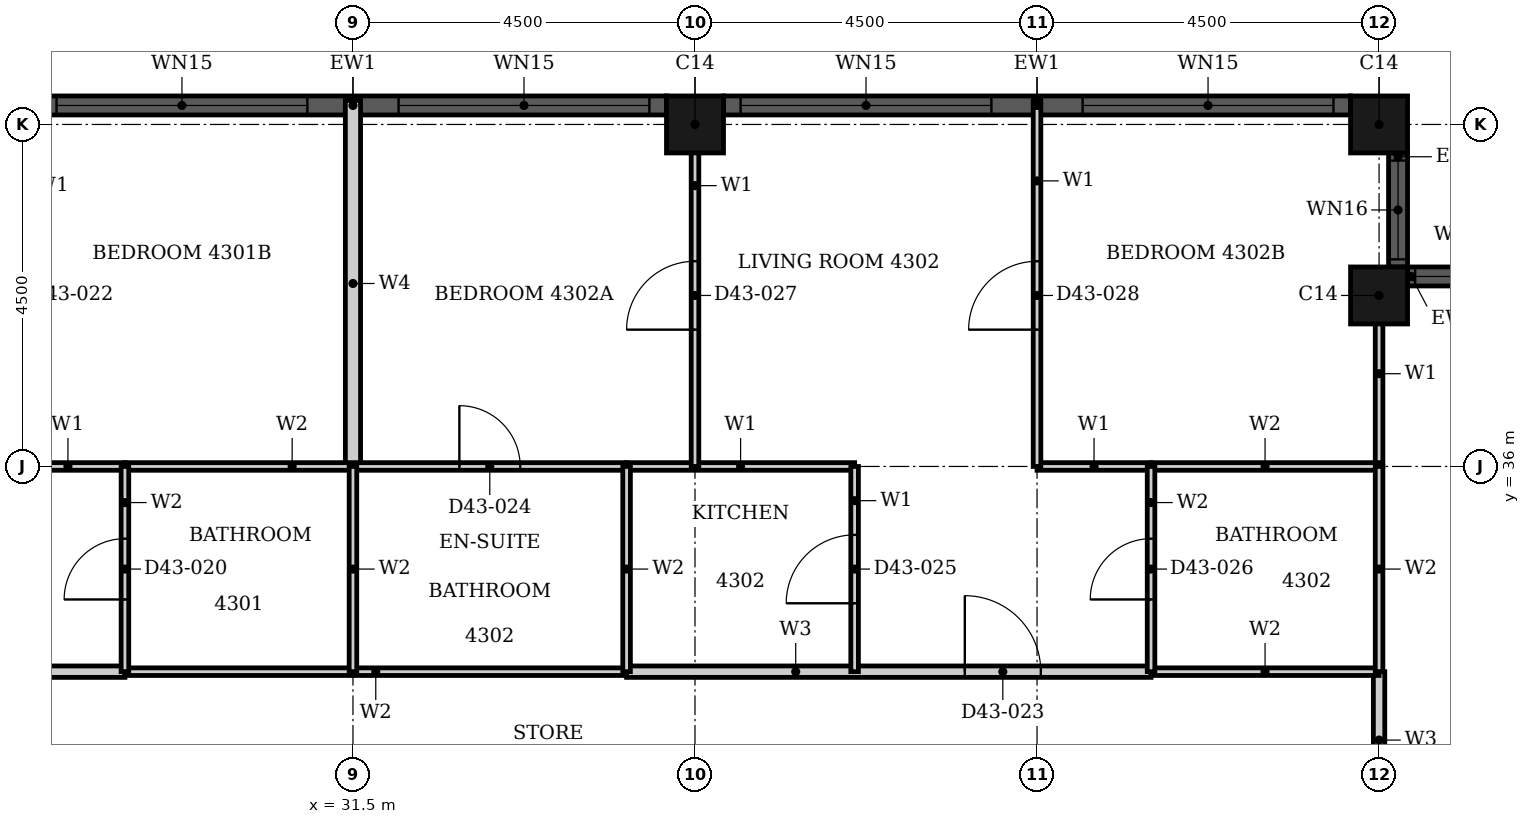
"""IFC4 building model, lengths in metres.
Left out: names, types, materials, properties, quantities, classifications, styles, units other than length and angle.
Written with IfcOpenShell. Run it as: python <this file> out.ifc"""

import sys

from ifc_helpers import new_model, si_unit, direction, frame, frame_2d, origin, origin_2d, place, context, subcontext, project, spatial, rectangle, hollow_rectangle, extrude, element, fill, save


model = new_model("IFC4")
c1 = context("Model", 3, precision=1e-05, world=origin(), true_north=direction((0.0, 1.0)))
c2 = subcontext(c1, "Body", "Model", "MODEL_VIEW")
j1 = project(units=[si_unit("LENGTHUNIT", "METRE"), si_unit("PLANEANGLEUNIT", "RADIAN")], contexts=[c1])
p1 = place(None, origin())
s1 = spatial("IfcSite", under=j1, at=p1, CompositionType="ELEMENT")
p2 = place(p1, origin())
s2 = spatial("IfcBuilding", under=s1, at=p2, CompositionType="ELEMENT")
p3 = place(p2, frame((0.0, 0.0, 172.8)))
s3 = spatial("IfcBuildingStorey", under=s2, at=p3, CompositionType="ELEMENT", Elevation=172.8)
for number, where, z_axis, x_axis in (
    (1, (45.0, 38.25, 0.0), (0.0, 0.0, 1.0), (1.0, 0.0, 0.0)),
    (2, (45.0, 40.5, 0.0), (0.0, 0.0, 1.0), (1.0, 0.0, 0.0)),
    (3, (36.0, 40.5, 0.0), (0.0, 0.0, 1.0), (1.0, 0.0, 0.0)),
):
    element("IfcColumn", number, at=place(p3, frame(where, z_axis=z_axis, x_axis=x_axis)), inside=s3, PredefinedType="COLUMN", context=c2, shape_type="SweptSolid", body=[
        extrude(hollow_rectangle(XDim=0.75, YDim=0.75, WallThickness=0.024, at=origin_2d()), origin(), (0.0, 0.0, 1.0), 3.7),
    ])
p4 = place(p3, frame((46.875, 38.5, 0.0), z_axis=(0.0, 0.0, 1.0), x_axis=(-1.0, 0.0, 0.0)))
e4 = element("IfcWall", 4, at=p4, inside=s3, PredefinedType="SOLIDWALL", context=c2, shape_type="SweptSolid", body=[
    extrude(rectangle(XDim=1.5, YDim=0.25, at=frame_2d((0.75, 0.0))), origin(), (0.0, 0.0, 1.0), 3.7),
])
p5 = place(p4, frame((0.1, 0.0, 0.9)))
e5 = element("IfcOpeningElement", 5, at=p5, cuts=e4, PredefinedType="OPENING", context=c2, shape_type="SweptSolid", body=[
    extrude(rectangle(XDim=1.3, YDim=1.85, at=frame_2d((0.65, 0.925))), frame((0.0, 0.135, 0.0), z_axis=(0.0, -1.0, 0.0), x_axis=(1.0, 0.0, 0.0)), (0.0, 0.0, 1.0), 0.27),
])
p6 = place(p3, frame((45.25, 38.625, 0.0), z_axis=(0.0, 0.0, 1.0), x_axis=(0.0, 1.0, 0.0)))
e6 = element("IfcWall", 6, at=p6, inside=s3, PredefinedType="SOLIDWALL", context=c2, shape_type="SweptSolid", body=[
    extrude(rectangle(XDim=1.5, YDim=0.25, at=frame_2d((0.75, 0.0))), origin(), (0.0, 0.0, 1.0), 3.7),
])
p7 = place(p6, frame((0.1, 0.0, 0.9)))
e7 = element("IfcOpeningElement", 7, at=p7, cuts=e6, PredefinedType="OPENING", context=c2, shape_type="SweptSolid", body=[
    extrude(rectangle(XDim=1.3, YDim=1.85, at=frame_2d((0.65, 0.925))), frame((0.0, 0.135, 0.0), z_axis=(0.0, -1.0, 0.0), x_axis=(1.0, 0.0, 0.0)), (0.0, 0.0, 1.0), 0.27),
])
p8 = place(p3, frame((44.625, 40.75, 0.0), z_axis=(0.0, 0.0, 1.0), x_axis=(-1.0, 0.0, 0.0)))
e8 = element("IfcWall", 8, at=p8, inside=s3, PredefinedType="SOLIDWALL", context=c2, shape_type="SweptSolid", body=[
    extrude(rectangle(XDim=8.25, YDim=0.25, at=frame_2d((4.125, 0.0))), origin(), (0.0, 0.0, 1.0), 3.7),
])
p9 = place(p8, frame((0.225, 0.0, 0.45)))
e9 = element("IfcOpeningElement", 9, at=p9, cuts=e8, PredefinedType="OPENING", context=c2, shape_type="SweptSolid", body=[
    extrude(rectangle(XDim=3.3, YDim=2.3, at=frame_2d((1.65, 1.15))), frame((0.0, 0.135, 0.0), z_axis=(0.0, -1.0, 0.0), x_axis=(1.0, 0.0, 0.0)), (0.0, 0.0, 1.0), 0.27),
])
p10 = place(p8, frame((4.725, 0.0, 0.45)))
e10 = element("IfcOpeningElement", 10, at=p10, cuts=e8, PredefinedType="OPENING", context=c2, shape_type="SweptSolid", body=[
    extrude(rectangle(XDim=3.3, YDim=2.3, at=frame_2d((1.65, 1.15))), frame((0.0, 0.135, 0.0), z_axis=(0.0, -1.0, 0.0), x_axis=(1.0, 0.0, 0.0)), (0.0, 0.0, 1.0), 0.27),
])
p11 = place(p3, frame((35.625, 40.75, 0.0), z_axis=(0.0, 0.0, 1.0), x_axis=(-1.0, 0.0, 0.0)))
e11 = element("IfcWall", 11, at=p11, inside=s3, PredefinedType="SOLIDWALL", context=c2, shape_type="SweptSolid", body=[
    extrude(rectangle(XDim=8.25, YDim=0.25, at=frame_2d((4.125, 0.0))), origin(), (0.0, 0.0, 1.0), 3.7),
])
p12 = place(p11, frame((0.225, 0.0, 0.45)))
e12 = element("IfcOpeningElement", 12, at=p12, cuts=e11, PredefinedType="OPENING", context=c2, shape_type="SweptSolid", body=[
    extrude(rectangle(XDim=3.3, YDim=2.3, at=frame_2d((1.65, 1.15))), frame((0.0, 0.135, 0.0), z_axis=(0.0, -1.0, 0.0), x_axis=(1.0, 0.0, 0.0)), (0.0, 0.0, 1.0), 0.27),
])
p13 = place(p11, frame((4.725, 0.0, 0.45)))
e13 = element("IfcOpeningElement", 13, at=p13, cuts=e11, PredefinedType="OPENING", context=c2, shape_type="SweptSolid", body=[
    extrude(rectangle(XDim=3.3, YDim=2.3, at=frame_2d((1.65, 1.15))), frame((0.0, 0.135, 0.0), z_axis=(0.0, -1.0, 0.0), x_axis=(1.0, 0.0, 0.0)), (0.0, 0.0, 1.0), 0.27),
])
p14 = place(p3, frame((21.6, 33.3, 0.0), z_axis=(0.0, 0.0, 1.0), x_axis=(1.0, 0.0, 0.0)))
e14 = element("IfcWall", 14, at=p14, inside=s3, PredefinedType="PARTITIONING", context=c2, shape_type="SweptSolid", body=[
    extrude(rectangle(XDim=6.9, YDim=0.15, at=frame_2d((3.45, 0.0))), origin(), (0.0, 0.0, 1.0), 3.4),
])
p15 = place(p14, frame((4.45, 0.0, 0.0)))
e15 = element("IfcOpeningElement", 15, at=p15, cuts=e14, PredefinedType="OPENING", context=c2, shape_type="SweptSolid", body=[
    extrude(rectangle(XDim=1.0, YDim=2.2, at=frame_2d((0.5, 1.1))), frame((0.0, 0.085, 0.0), z_axis=(0.0, -1.0, 0.0), x_axis=(1.0, 0.0, 0.0)), (0.0, 0.0, 1.0), 0.17),
])
p16 = place(p3, frame((35.1, 33.3, 0.0), z_axis=(0.0, 0.0, 1.0), x_axis=(1.0, 0.0, 0.0)))
e16 = element("IfcWall", 16, at=p16, inside=s3, PredefinedType="PARTITIONING", context=c2, shape_type="SweptSolid", body=[
    extrude(rectangle(XDim=6.9, YDim=0.15, at=frame_2d((3.45, 0.0))), origin(), (0.0, 0.0, 1.0), 3.4),
])
p17 = place(p16, frame((4.45, 0.0, 0.0)))
e17 = element("IfcOpeningElement", 17, at=p17, cuts=e16, PredefinedType="OPENING", context=c2, shape_type="SweptSolid", body=[
    extrude(rectangle(XDim=1.0, YDim=2.2, at=frame_2d((0.5, 1.1))), frame((0.0, 0.085, 0.0), z_axis=(0.0, -1.0, 0.0), x_axis=(1.0, 0.0, 0.0)), (0.0, 0.0, 1.0), 0.17),
])
p18 = place(p3, frame((45.0, 31.5, 0.0), z_axis=(0.0, 0.0, 1.0), x_axis=(0.0, 1.0, 0.0)))
e18 = element("IfcWall", 18, at=p18, inside=s3, PredefinedType="PARTITIONING", context=c2, shape_type="SweptSolid", body=[
    extrude(rectangle(XDim=1.8, YDim=0.15, at=frame_2d((0.9, 0.0))), origin(), (0.0, 0.0, 1.0), 3.4),
])
for number, where, z_axis, x_axis in (
    (19, (27.0, 36.0, 0.0), (0.0, 0.0, 1.0), (1.0, 0.0, 0.0)),
    (20, (40.5, 36.0, 0.0), (0.0, 0.0, 1.0), (1.0, 0.0, 0.0)),
):
    element("IfcWall", number, at=place(p3, frame(where, z_axis=z_axis, x_axis=x_axis)), inside=s3, PredefinedType="PARTITIONING", context=c2, shape_type="SweptSolid", body=[
        extrude(rectangle(XDim=1.5, YDim=0.1, at=frame_2d((0.75, 0.0))), origin(), (0.0, 0.0, 1.0), 3.4),
    ])
p19 = place(p3, frame((35.1, 36.0, 0.0), z_axis=(0.0, 0.0, 1.0), x_axis=(1.0, 0.0, 0.0)))
e21 = element("IfcWall", 21, at=p19, inside=s3, PredefinedType="PARTITIONING", context=c2, shape_type="SweptSolid", body=[
    extrude(rectangle(XDim=3.0, YDim=0.1, at=frame_2d((1.5, 0.0))), origin(), (0.0, 0.0, 1.0), 3.4),
])
p20 = place(p3, frame((36.0, 36.0, 0.0), z_axis=(0.0, 0.0, 1.0), x_axis=(0.0, 1.0, 0.0)))
e22 = element("IfcWall", 22, at=p20, inside=s3, PredefinedType="PARTITIONING", context=c2, shape_type="SweptSolid", body=[
    extrude(rectangle(XDim=4.69, YDim=0.1, at=frame_2d((2.345, 0.0))), origin(), (0.0, 0.0, 1.0), 3.4),
])
p21 = place(p20, frame((1.8, 0.0, 0.0)))
e23 = element("IfcOpeningElement", 23, at=p21, cuts=e22, PredefinedType="OPENING", context=c2, shape_type="SweptSolid", body=[
    extrude(rectangle(XDim=0.9, YDim=2.1, at=frame_2d((0.45, 1.05))), frame((0.0, 0.06, 0.0), z_axis=(0.0, -1.0, 0.0), x_axis=(1.0, 0.0, 0.0)), (0.0, 0.0, 1.0), 0.12),
])
p22 = place(p3, frame((38.1, 33.3, 0.0), z_axis=(0.0, 0.0, 1.0), x_axis=(0.0, 1.0, 0.0)))
e24 = element("IfcWall", 24, at=p22, inside=s3, PredefinedType="PARTITIONING", context=c2, shape_type="SweptSolid", body=[
    extrude(rectangle(XDim=2.7, YDim=0.1, at=frame_2d((1.35, 0.0))), origin(), (0.0, 0.0, 1.0), 3.4),
])
p23 = place(p22, frame((0.9, 0.0, 0.0)))
e25 = element("IfcOpeningElement", 25, at=p23, cuts=e24, PredefinedType="OPENING", context=c2, shape_type="SweptSolid", body=[
    extrude(rectangle(XDim=0.9, YDim=2.1, at=frame_2d((0.45, 1.05))), frame((0.0, 0.06, 0.0), z_axis=(0.0, -1.0, 0.0), x_axis=(1.0, 0.0, 0.0)), (0.0, 0.0, 1.0), 0.12),
])
p24 = place(p3, frame((40.5, 36.0, 0.0), z_axis=(0.0, 0.0, 1.0), x_axis=(0.0, 1.0, 0.0)))
e26 = element("IfcWall", 26, at=p24, inside=s3, PredefinedType="PARTITIONING", context=c2, shape_type="SweptSolid", body=[
    extrude(rectangle(XDim=4.815, YDim=0.1, at=frame_2d((2.407, 0.0))), origin(), (0.0, 0.0, 1.0), 3.4),
])
p25 = place(p24, frame((1.8, 0.0, 0.0)))
e27 = element("IfcOpeningElement", 27, at=p25, cuts=e26, PredefinedType="OPENING", context=c2, shape_type="SweptSolid", body=[
    extrude(rectangle(XDim=0.9, YDim=2.1, at=frame_2d((0.45, 1.05))), frame((0.0, 0.06, 0.0), z_axis=(0.0, -1.0, 0.0), x_axis=(1.0, 0.0, 0.0)), (0.0, 0.0, 1.0), 0.12),
])
p26 = place(p3, frame((45.0, 36.001, 0.0), z_axis=(0.0, 0.0, 1.0), x_axis=(0.0, 1.0, 0.0)))
e28 = element("IfcWall", 28, at=p26, inside=s3, PredefinedType="PARTITIONING", context=c2, shape_type="SweptSolid", body=[
    extrude(rectangle(XDim=2.439, YDim=0.1, at=frame_2d((1.219, 0.0))), origin(), (0.0, 0.0, 1.0), 3.4),
])
p27 = place(p3, frame((31.5, 36.0, 0.0), z_axis=(0.0, 0.0, 1.0), x_axis=(0.0, 1.0, 0.0)))
e29 = element("IfcWall", 29, at=p27, inside=s3, PredefinedType="PARTITIONING", context=c2, shape_type="SweptSolid", body=[
    extrude(rectangle(XDim=4.815, YDim=0.2, at=frame_2d((2.407, 0.0))), origin(), (0.0, 0.0, 1.0), 3.4),
])
p28 = place(p3, frame((28.5, 33.3, 0.0), z_axis=(0.0, 0.0, 1.0), x_axis=(1.0, 0.0, 0.0)))
e30 = element("IfcWall", 30, at=p28, inside=s3, PredefinedType="PARTITIONING", context=c2, shape_type="SweptSolid", body=[
    extrude(rectangle(XDim=6.6, YDim=0.1, at=frame_2d((3.3, 0.0))), origin(), (0.0, 0.0, 1.0), 3.4),
])
p29 = place(p3, frame((42.0, 33.3, 0.0), z_axis=(0.0, 0.0, 1.0), x_axis=(1.0, 0.0, 0.0)))
e31 = element("IfcWall", 31, at=p29, inside=s3, PredefinedType="PARTITIONING", context=c2, shape_type="SweptSolid", body=[
    extrude(rectangle(XDim=3.0, YDim=0.1, at=frame_2d((1.5, 0.0))), origin(), (0.0, 0.0, 1.0), 3.4),
])
p30 = place(p3, frame((28.5, 36.0, 0.0), z_axis=(0.0, 0.0, 1.0), x_axis=(1.0, 0.0, 0.0)))
e32 = element("IfcWall", 32, at=p30, inside=s3, PredefinedType="PARTITIONING", context=c2, shape_type="SweptSolid", body=[
    extrude(rectangle(XDim=6.6, YDim=0.1, at=frame_2d((3.3, 0.0))), origin(), (0.0, 0.0, 1.0), 3.4),
])
p31 = place(p30, frame((4.4, 0.0, 0.0)))
e33 = element("IfcOpeningElement", 33, at=p31, cuts=e32, PredefinedType="OPENING", context=c2, shape_type="SweptSolid", body=[
    extrude(rectangle(XDim=0.8, YDim=2.1, at=frame_2d((0.4, 1.05))), frame((0.0, 0.06, 0.0), z_axis=(0.0, -1.0, 0.0), x_axis=(1.0, 0.0, 0.0)), (0.0, 0.0, 1.0), 0.12),
])
p32 = place(p3, frame((42.0, 36.0, 0.0), z_axis=(0.0, 0.0, 1.0), x_axis=(1.0, 0.0, 0.0)))
e34 = element("IfcWall", 34, at=p32, inside=s3, PredefinedType="PARTITIONING", context=c2, shape_type="SweptSolid", body=[
    extrude(rectangle(XDim=3.0, YDim=0.1, at=frame_2d((1.5, 0.0))), origin(), (0.0, 0.0, 1.0), 3.4),
])
p33 = place(p3, frame((28.5, 33.3, 0.0), z_axis=(0.0, 0.0, 1.0), x_axis=(0.0, 1.0, 0.0)))
e35 = element("IfcWall", 35, at=p33, inside=s3, PredefinedType="PARTITIONING", context=c2, shape_type="SweptSolid", body=[
    extrude(rectangle(XDim=2.7, YDim=0.1, at=frame_2d((1.35, 0.0))), origin(), (0.0, 0.0, 1.0), 3.4),
])
p34 = place(p33, frame((0.95, 0.0, 0.0)))
e36 = element("IfcOpeningElement", 36, at=p34, cuts=e35, PredefinedType="OPENING", context=c2, shape_type="SweptSolid", body=[
    extrude(rectangle(XDim=0.8, YDim=2.1, at=frame_2d((0.4, 1.05))), frame((0.0, 0.06, 0.0), z_axis=(0.0, -1.0, 0.0), x_axis=(1.0, 0.0, 0.0)), (0.0, 0.0, 1.0), 0.12),
])
for number, where, z_axis, x_axis in (
    (37, (31.5, 33.3, 0.0), (0.0, 0.0, 1.0), (0.0, 1.0, 0.0)),
    (38, (35.1, 33.3, 0.0), (0.0, 0.0, 1.0), (0.0, 1.0, 0.0)),
):
    element("IfcWall", number, at=place(p3, frame(where, z_axis=z_axis, x_axis=x_axis)), inside=s3, PredefinedType="PARTITIONING", context=c2, shape_type="SweptSolid", body=[
        extrude(rectangle(XDim=2.7, YDim=0.1, at=frame_2d((1.35, 0.0))), origin(), (0.0, 0.0, 1.0), 3.4),
    ])
p35 = place(p3, frame((42.0, 33.3, 0.0), z_axis=(0.0, 0.0, 1.0), x_axis=(0.0, 1.0, 0.0)))
e39 = element("IfcWall", 39, at=p35, inside=s3, PredefinedType="PARTITIONING", context=c2, shape_type="SweptSolid", body=[
    extrude(rectangle(XDim=2.7, YDim=0.1, at=frame_2d((1.35, 0.0))), origin(), (0.0, 0.0, 1.0), 3.4),
])
p36 = place(p35, frame((0.95, 0.0, 0.0)))
e40 = element("IfcOpeningElement", 40, at=p36, cuts=e39, PredefinedType="OPENING", context=c2, shape_type="SweptSolid", body=[
    extrude(rectangle(XDim=0.8, YDim=2.1, at=frame_2d((0.4, 1.05))), frame((0.0, 0.06, 0.0), z_axis=(0.0, -1.0, 0.0), x_axis=(1.0, 0.0, 0.0)), (0.0, 0.0, 1.0), 0.12),
])
p37 = place(p3, frame((45.0, 33.3, 0.0), z_axis=(0.0, 0.0, 1.0), x_axis=(0.0, 1.0, 0.0)))
e41 = element("IfcWall", 41, at=p37, inside=s3, PredefinedType="PARTITIONING", context=c2, shape_type="SweptSolid", body=[
    extrude(rectangle(XDim=2.7, YDim=0.1, at=frame_2d((1.35, 0.0))), origin(), (0.0, 0.0, 1.0), 3.4),
])
p38 = place(p5, origin())
e42 = element("IfcWindow", 42, at=p38, inside=s3, PartitioningType="SINGLE_PANEL", PredefinedType="WINDOW", context=c2, shape_type="SweptSolid", body=[
    extrude(rectangle(XDim=1.3, YDim=1.85, at=frame_2d((0.65, 0.925))), frame((0.0, 0.03, 0.0), z_axis=(0.0, -1.0, 0.0), x_axis=(1.0, 0.0, 0.0)), (0.0, 0.0, 1.0), 0.06),
])
fill(e5, e42)
p39 = place(p7, origin())
e43 = element("IfcWindow", 43, at=p39, inside=s3, PartitioningType="SINGLE_PANEL", PredefinedType="WINDOW", context=c2, shape_type="SweptSolid", body=[
    extrude(rectangle(XDim=1.3, YDim=1.85, at=frame_2d((0.65, 0.925))), frame((0.0, 0.03, 0.0), z_axis=(0.0, -1.0, 0.0), x_axis=(1.0, 0.0, 0.0)), (0.0, 0.0, 1.0), 0.06),
])
fill(e7, e43)
p40 = place(p9, origin())
e44 = element("IfcWindow", 44, at=p40, inside=s3, PartitioningType="SINGLE_PANEL", PredefinedType="WINDOW", context=c2, shape_type="SweptSolid", body=[
    extrude(rectangle(XDim=3.3, YDim=2.3, at=frame_2d((1.65, 1.15))), frame((0.0, 0.03, 0.0), z_axis=(0.0, -1.0, 0.0), x_axis=(1.0, 0.0, 0.0)), (0.0, 0.0, 1.0), 0.06),
])
fill(e9, e44)
p41 = place(p10, origin())
e45 = element("IfcWindow", 45, at=p41, inside=s3, PartitioningType="SINGLE_PANEL", PredefinedType="WINDOW", context=c2, shape_type="SweptSolid", body=[
    extrude(rectangle(XDim=3.3, YDim=2.3, at=frame_2d((1.65, 1.15))), frame((0.0, 0.03, 0.0), z_axis=(0.0, -1.0, 0.0), x_axis=(1.0, 0.0, 0.0)), (0.0, 0.0, 1.0), 0.06),
])
fill(e10, e45)
p42 = place(p12, origin())
e46 = element("IfcWindow", 46, at=p42, inside=s3, PartitioningType="SINGLE_PANEL", PredefinedType="WINDOW", context=c2, shape_type="SweptSolid", body=[
    extrude(rectangle(XDim=3.3, YDim=2.3, at=frame_2d((1.65, 1.15))), frame((0.0, 0.03, 0.0), z_axis=(0.0, -1.0, 0.0), x_axis=(1.0, 0.0, 0.0)), (0.0, 0.0, 1.0), 0.06),
])
fill(e12, e46)
p43 = place(p13, origin())
e47 = element("IfcWindow", 47, at=p43, inside=s3, PartitioningType="SINGLE_PANEL", PredefinedType="WINDOW", context=c2, shape_type="SweptSolid", body=[
    extrude(rectangle(XDim=3.3, YDim=2.3, at=frame_2d((1.65, 1.15))), frame((0.0, 0.03, 0.0), z_axis=(0.0, -1.0, 0.0), x_axis=(1.0, 0.0, 0.0)), (0.0, 0.0, 1.0), 0.06),
])
fill(e13, e47)
p44 = place(p34, origin())
e48 = element("IfcDoor", 48, at=p44, inside=s3, OperationType="SINGLE_SWING_RIGHT", PredefinedType="DOOR", context=c2, shape_type="SweptSolid", body=[
    extrude(rectangle(XDim=0.8, YDim=2.1, at=frame_2d((0.4, 1.05))), frame((0.0, 0.025, 0.0), z_axis=(0.0, -1.0, 0.0), x_axis=(1.0, 0.0, 0.0)), (0.0, 0.0, 1.0), 0.05),
])
fill(e36, e48)
p45 = place(p17, origin())
e49 = element("IfcDoor", 49, at=p45, inside=s3, OperationType="SINGLE_SWING_LEFT", PredefinedType="DOOR", context=c2, shape_type="SweptSolid", body=[
    extrude(rectangle(XDim=1.0, YDim=2.2, at=frame_2d((0.5, 1.1))), frame((0.0, 0.025, 0.0), z_axis=(0.0, -1.0, 0.0), x_axis=(1.0, 0.0, 0.0)), (0.0, 0.0, 1.0), 0.05),
])
fill(e17, e49)
p46 = place(p31, origin())
e50 = element("IfcDoor", 50, at=p46, inside=s3, OperationType="SINGLE_SWING_RIGHT", PredefinedType="DOOR", context=c2, shape_type="SweptSolid", body=[
    extrude(rectangle(XDim=0.8, YDim=2.1, at=frame_2d((0.4, 1.05))), frame((0.0, 0.025, 0.0), z_axis=(0.0, -1.0, 0.0), x_axis=(1.0, 0.0, 0.0)), (0.0, 0.0, 1.0), 0.05),
])
fill(e33, e50)
p47 = place(p23, origin())
e51 = element("IfcDoor", 51, at=p47, inside=s3, OperationType="SINGLE_SWING_RIGHT", PredefinedType="DOOR", context=c2, shape_type="SweptSolid", body=[
    extrude(rectangle(XDim=0.9, YDim=2.1, at=frame_2d((0.45, 1.05))), frame((0.0, 0.025, 0.0), z_axis=(0.0, -1.0, 0.0), x_axis=(1.0, 0.0, 0.0)), (0.0, 0.0, 1.0), 0.05),
])
fill(e25, e51)
p48 = place(p36, origin())
e52 = element("IfcDoor", 52, at=p48, inside=s3, OperationType="SINGLE_SWING_LEFT", PredefinedType="DOOR", context=c2, shape_type="SweptSolid", body=[
    extrude(rectangle(XDim=0.8, YDim=2.1, at=frame_2d((0.4, 1.05))), frame((0.0, 0.025, 0.0), z_axis=(0.0, -1.0, 0.0), x_axis=(1.0, 0.0, 0.0)), (0.0, 0.0, 1.0), 0.05),
])
fill(e40, e52)
p49 = place(p21, origin())
e53 = element("IfcDoor", 53, at=p49, inside=s3, OperationType="SINGLE_SWING_LEFT", PredefinedType="DOOR", context=c2, shape_type="SweptSolid", body=[
    extrude(rectangle(XDim=0.9, YDim=2.1, at=frame_2d((0.45, 1.05))), frame((0.0, 0.025, 0.0), z_axis=(0.0, -1.0, 0.0), x_axis=(1.0, 0.0, 0.0)), (0.0, 0.0, 1.0), 0.05),
])
fill(e23, e53)
p50 = place(p25, origin())
e54 = element("IfcDoor", 54, at=p50, inside=s3, OperationType="SINGLE_SWING_LEFT", PredefinedType="DOOR", context=c2, shape_type="SweptSolid", body=[
    extrude(rectangle(XDim=0.9, YDim=2.1, at=frame_2d((0.45, 1.05))), frame((0.0, 0.025, 0.0), z_axis=(0.0, -1.0, 0.0), x_axis=(1.0, 0.0, 0.0)), (0.0, 0.0, 1.0), 0.05),
])
fill(e27, e54)
save(model, sys.argv[1])
